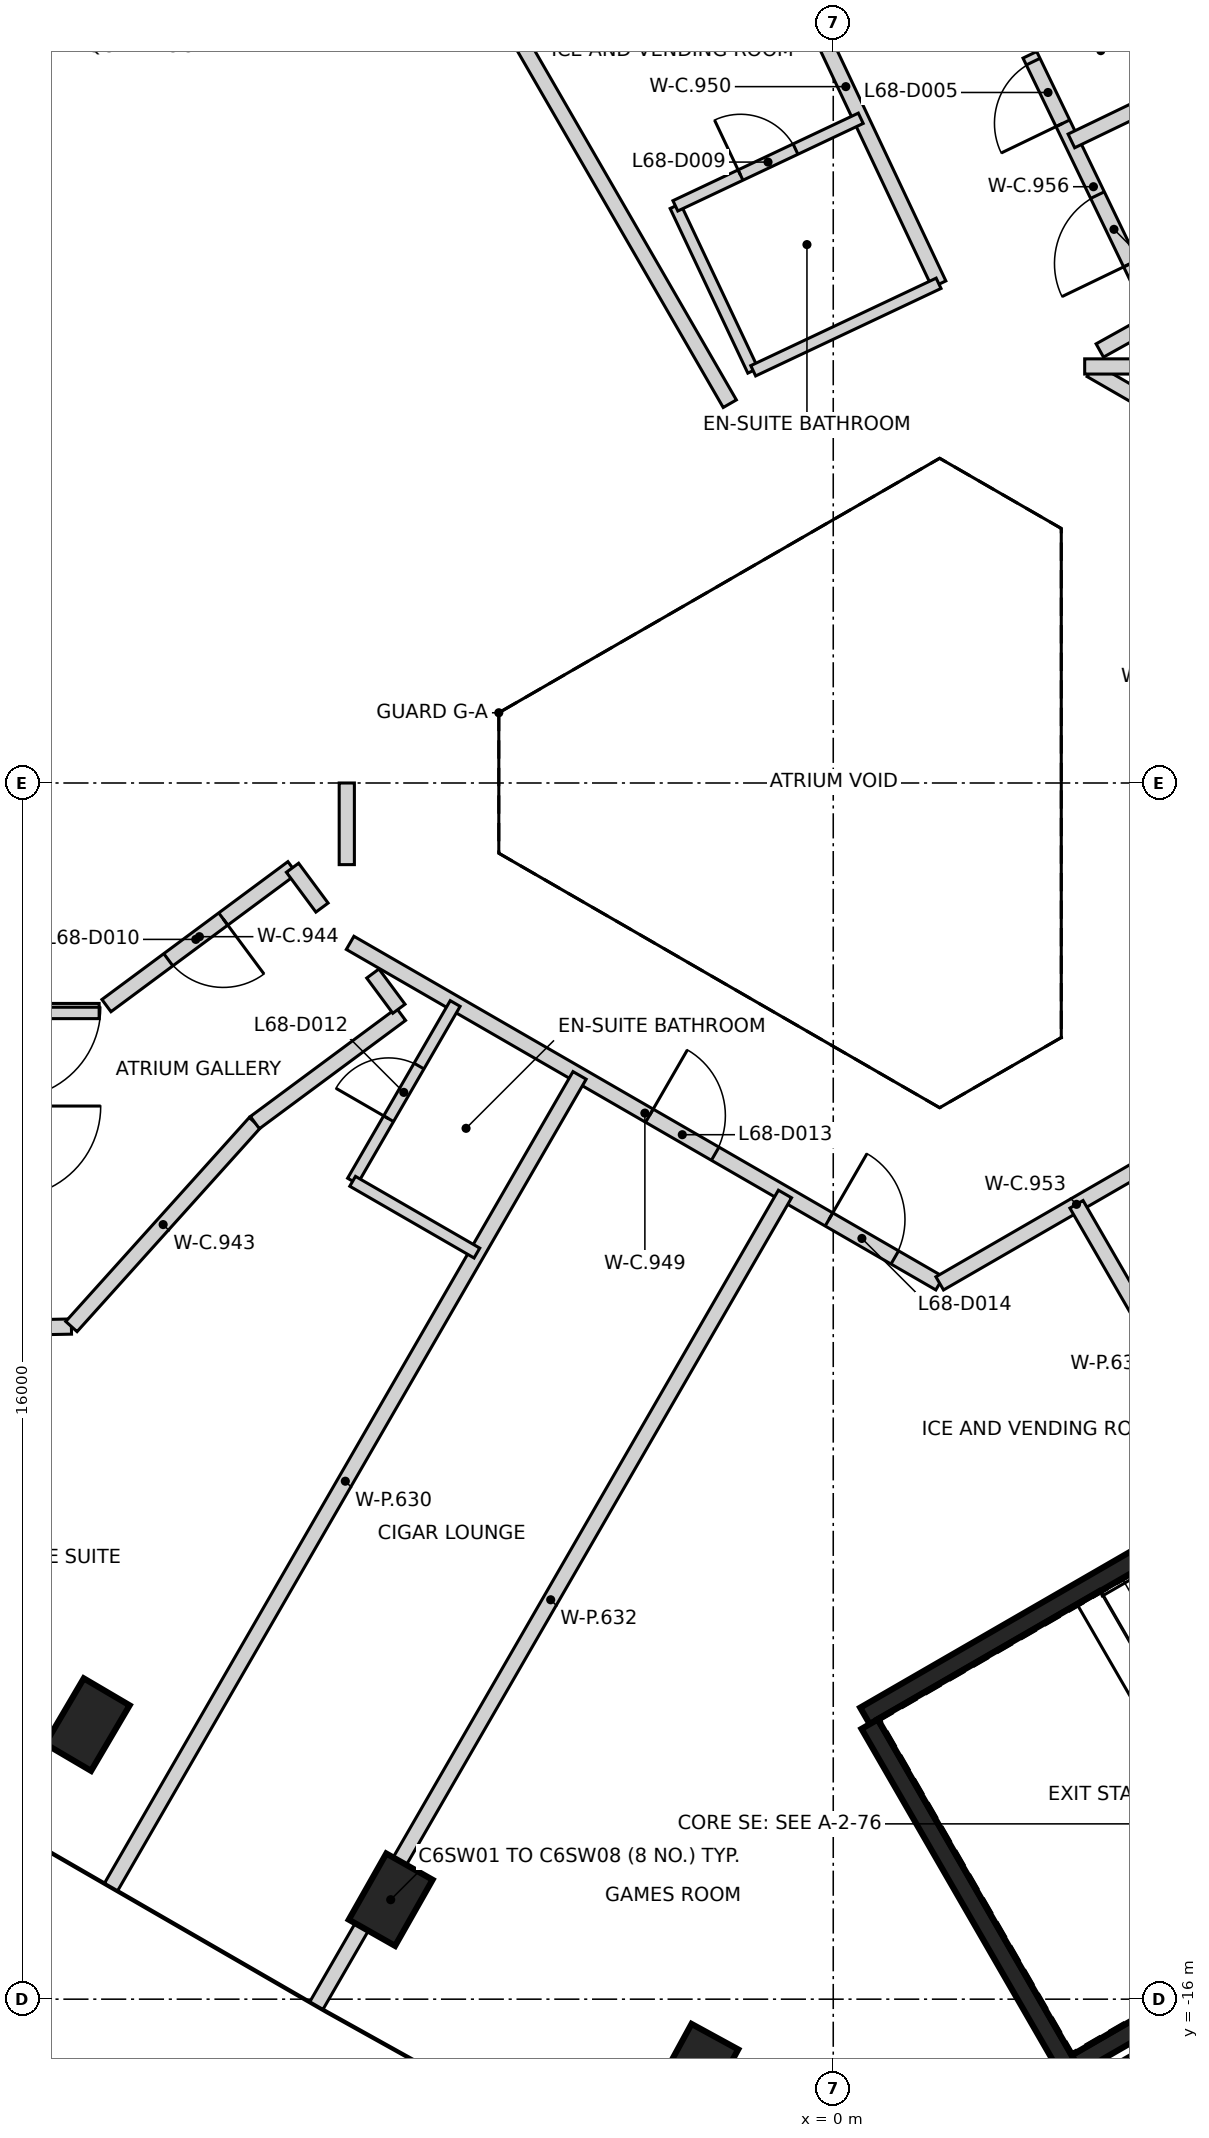
"""IFC4 building model, lengths in metres.
Left out: names, types, materials, properties, quantities, classifications, styles, units other than length and angle.
Written with IfcOpenShell. Run it as: python <this file> out.ifc"""

import sys

from ifc_helpers import new_model, si_unit, direction, frame, frame_2d, origin, origin_2d, place, context, subcontext, project, spatial, rectangle, extrude, element, fill, save


model = new_model("IFC4")
c1 = context("Model", 3, precision=1e-05, world=origin(), true_north=direction((0.0, 1.0)))
c2 = subcontext(c1, "Body", "Model", "MODEL_VIEW")
j1 = project(units=[si_unit("LENGTHUNIT", "METRE"), si_unit("PLANEANGLEUNIT", "RADIAN")], contexts=[c1])
p1 = place(None, origin())
s1 = spatial("IfcSite", under=j1, at=p1, CompositionType="ELEMENT")
p2 = place(p1, origin())
s2 = spatial("IfcBuilding", under=s1, at=p2, CompositionType="ELEMENT")
p3 = place(p2, frame((0.0, 0.0, 269.4)))
s3 = spatial("IfcBuildingStorey", under=s2, at=p3, CompositionType="ELEMENT", Elevation=269.4)
for number, where, z_axis, x_axis in (
    (1, (-9.812, -12.388, -0.35), (0.0, 0.0, 1.0), (0.507, 0.862, 0.0)),
    (2, (-5.822, -14.691, -0.35), (0.0, 0.0, 1.0), (0.493, 0.87, 0.0)),
    (3, (-1.797, -16.932, -0.35), (0.0, 0.0, 1.0), (0.479, 0.878, 0.0)),
):
    element("IfcColumn", number, at=place(p3, frame(where, z_axis=z_axis, x_axis=x_axis)), inside=s3, PredefinedType="COLUMN", context=c2, shape_type="SweptSolid", body=[
        extrude(rectangle(XDim=1.0, YDim=0.7, at=origin_2d()), origin(), (0.0, 0.0, 1.0), 3.6),
    ])
p4 = place(p3, frame((10.42, 6.498, 0.0), z_axis=(0.0, 0.0, 1.0), x_axis=(-0.866021906294, 0.500006057782, 0.0)))
e4 = element("IfcWall", 4, at=p4, inside=s3, PredefinedType="SHEAR", context=c2, shape_type="SweptSolid", body=[
    extrude(rectangle(XDim=11.55, YDim=0.25, at=frame_2d((5.775, 0.0))), origin(), (0.0, 0.0, 1.0), 3.25),
])
p5 = place(p4, frame((10.025, 0.0, 0.0)))
e5 = element("IfcOpeningElement", 5, at=p5, cuts=e4, PredefinedType="OPENING", context=c2, shape_type="SweptSolid", body=[
    extrude(rectangle(XDim=1.2, YDim=2.1, at=frame_2d((0.6, 1.05))), frame((0.0, 0.135, 0.0), z_axis=(0.0, -1.0, 0.0), x_axis=(1.0, 0.0, 0.0)), (0.0, 0.0, 1.0), 0.27),
])
p6 = place(p4, frame((8.725, 0.0, 0.0)))
e6 = element("IfcOpeningElement", 6, at=p6, cuts=e4, PredefinedType="OPENING", context=c2, shape_type="SweptSolid", body=[
    extrude(rectangle(XDim=1.2, YDim=2.1, at=frame_2d((0.6, 1.05))), frame((0.0, 0.135, 0.0), z_axis=(0.0, -1.0, 0.0), x_axis=(1.0, 0.0, 0.0)), (0.0, 0.0, 1.0), 0.27),
])
p7 = place(p3, frame((0.417, -12.273, 0.0), z_axis=(0.0, 0.0, 1.0), x_axis=(0.866021906294, 0.500006057782, 0.0)))
e7 = element("IfcWall", 7, at=p7, inside=s3, PredefinedType="SHEAR", context=c2, shape_type="SweptSolid", body=[
    extrude(rectangle(XDim=11.55, YDim=0.25, at=frame_2d((5.775, 0.0))), origin(), (0.0, 0.0, 1.0), 3.25),
])
p8 = place(p7, frame((10.025, 0.0, 0.0)))
e8 = element("IfcOpeningElement", 8, at=p8, cuts=e7, PredefinedType="OPENING", context=c2, shape_type="SweptSolid", body=[
    extrude(rectangle(XDim=1.2, YDim=2.1, at=frame_2d((0.6, 1.05))), frame((0.0, 0.135, 0.0), z_axis=(0.0, -1.0, 0.0), x_axis=(1.0, 0.0, 0.0)), (0.0, 0.0, 1.0), 0.27),
])
p9 = place(p7, frame((8.725, 0.0, 0.0)))
e9 = element("IfcOpeningElement", 9, at=p9, cuts=e7, PredefinedType="OPENING", context=c2, shape_type="SweptSolid", body=[
    extrude(rectangle(XDim=1.2, YDim=2.1, at=frame_2d((0.6, 1.05))), frame((0.0, 0.135, 0.0), z_axis=(0.0, -1.0, 0.0), x_axis=(1.0, 0.0, 0.0)), (0.0, 0.0, 1.0), 0.27),
])
p10 = place(p3, frame((3.235, -17.153, 0.0), z_axis=(0.0, 0.0, 1.0), x_axis=(-0.500008851346, 0.866020293397, 0.0)))
e10 = element("IfcWall", 10, at=p10, inside=s3, PredefinedType="SHEAR", context=c2, shape_type="SweptSolid", body=[
    extrude(rectangle(XDim=5.51, YDim=0.25, at=frame_2d((2.755, 0.0))), origin(), (0.0, 0.0, 1.0), 3.25),
])
p11 = place(p3, frame((1.669, -18.19, 0.0), z_axis=(0.0, 0.0, 1.0), x_axis=(0.866042235819, 0.499970844928, 0.0)))
e11 = element("IfcWall", 11, at=p11, inside=s3, PredefinedType="SHEAR", context=c2, shape_type="SweptSolid", body=[
    extrude(rectangle(XDim=2.865, YDim=0.25, at=frame_2d((1.432, 0.0))), origin(), (0.0, 0.0, 1.0), 3.25),
])
p12 = place(p3, frame((5.431, -15.556, 0.0), z_axis=(0.0, 0.0, 1.0), x_axis=(-0.866022940537, -0.500004266446, 0.0)))
e12 = element("IfcWall", 12, at=p12, inside=s3, PredefinedType="SHEAR", context=c2, shape_type="SweptSolid", body=[
    extrude(rectangle(XDim=2.575, YDim=0.25, at=frame_2d((1.287, 0.0))), origin(), (0.0, 0.0, 1.0), 3.25),
])
p13 = place(p3, frame((-16.732, -7.282, 0.0), z_axis=(0.0, 0.0, 1.0), x_axis=(0.999809119854, 0.019537754635, 0.0)))
e13 = element("IfcWall", 13, at=p13, inside=s3, PredefinedType="PARTITIONING", context=c2, shape_type="SweptSolid", body=[
    extrude(rectangle(XDim=6.71, YDim=0.2, at=frame_2d((3.355, 0.0))), origin(), (0.0, 0.0, 1.0), 3.25),
])
p14 = place(p13, frame((3.619, 0.0, 0.0)))
e14 = element("IfcOpeningElement", 14, at=p14, cuts=e13, PredefinedType="OPENING", context=c2, shape_type="SweptSolid", body=[
    extrude(rectangle(XDim=0.95, YDim=2.1, at=frame_2d((0.475, 1.05))), frame((0.0, 0.11, 0.0), z_axis=(0.0, -1.0, 0.0), x_axis=(1.0, 0.0, 0.0)), (0.0, 0.0, 1.0), 0.22),
])
p15 = place(p3, frame((-10.652, -3.0, 0.0), z_axis=(0.0, 0.0, 1.0), x_axis=(1.0, 0.0, 0.0)))
e15 = element("IfcWall", 15, at=p15, inside=s3, PredefinedType="PARTITIONING", context=c2, shape_type="SweptSolid", body=[
    extrude(rectangle(XDim=0.994, YDim=0.2, at=frame_2d((0.497, 0.0))), origin(), (0.0, 0.0, 1.0), 3.25),
])
p16 = place(p3, frame((-10.023, -7.151, 0.0), z_axis=(0.0, 0.0, 1.0), x_axis=(0.668886243279, 0.743364778256, 0.0)))
e16 = element("IfcWall", 16, at=p16, inside=s3, PredefinedType="PARTITIONING", context=c2, shape_type="SweptSolid", body=[
    extrude(rectangle(XDim=3.609, YDim=0.2, at=frame_2d((1.805, 0.0))), origin(), (0.0, 0.0, 1.0), 3.25),
])
p17 = place(p3, frame((-7.115, -1.115, 0.0), z_axis=(0.0, 0.0, 1.0), x_axis=(-0.803344165632, -0.595515030495, 0.0)))
e17 = element("IfcWall", 17, at=p17, inside=s3, PredefinedType="PARTITIONING", context=c2, shape_type="SweptSolid", body=[
    extrude(rectangle(XDim=3.046, YDim=0.2, at=frame_2d((1.523, 0.0))), origin(), (0.0, 0.0, 1.0), 3.25),
])
p18 = place(p17, frame((1.133, 0.0, 0.0)))
e18 = element("IfcOpeningElement", 18, at=p18, cuts=e17, PredefinedType="OPENING", context=c2, shape_type="SweptSolid", body=[
    extrude(rectangle(XDim=0.9, YDim=2.1, at=frame_2d((0.45, 1.05))), frame((0.0, 0.11, 0.0), z_axis=(0.0, -1.0, 0.0), x_axis=(1.0, 0.0, 0.0)), (0.0, 0.0, 1.0), 0.22),
])
p19 = place(p3, frame((-7.609, -4.468, 0.0), z_axis=(0.0, 0.0, 1.0), x_axis=(0.803414413351, 0.595420255298, 0.0)))
e19 = element("IfcWall", 19, at=p19, inside=s3, PredefinedType="PARTITIONING", context=c2, shape_type="SweptSolid", body=[
    extrude(rectangle(XDim=2.393, YDim=0.2, at=frame_2d((1.197, 0.0))), origin(), (0.0, 0.0, 1.0), 3.25),
])
p20 = place(p3, frame((-7.114, -1.115, 0.0), z_axis=(0.0, 0.0, 1.0), x_axis=(0.595075286625, -0.803669959155, 0.0)))
e20 = element("IfcWall", 20, at=p20, inside=s3, PredefinedType="PARTITIONING", context=c2, shape_type="SweptSolid", body=[
    extrude(rectangle(XDim=0.652, YDim=0.2, at=frame_2d((0.326, 0.0))), origin(), (0.0, 0.0, 1.0), 3.25),
])
p21 = place(p3, frame((-6.4, -1.074, 0.0), z_axis=(0.0, 0.0, 1.0), x_axis=(0.0, 1.0, 0.0)))
e21 = element("IfcWall", 21, at=p21, inside=s3, PredefinedType="PARTITIONING", context=c2, shape_type="SweptSolid", body=[
    extrude(rectangle(XDim=1.074, YDim=0.2, at=frame_2d((0.537, 0.0))), origin(), (0.0, 0.0, 1.0), 3.25),
])
p22 = place(p3, frame((-6.057, -2.507, 0.0), z_axis=(0.0, 0.0, 1.0), x_axis=(0.594974339713, -0.803744695213, 0.0)))
e22 = element("IfcWall", 22, at=p22, inside=s3, PredefinedType="PARTITIONING", context=c2, shape_type="SweptSolid", body=[
    extrude(rectangle(XDim=0.576, YDim=0.2, at=frame_2d((0.288, 0.0))), origin(), (0.0, 0.0, 1.0), 3.25),
])
p23 = place(p3, frame((-6.356, -2.103, 0.0), z_axis=(0.0, 0.0, 1.0), x_axis=(0.865939059902, -0.50014952218, 0.0)))
e23 = element("IfcWall", 23, at=p23, inside=s3, PredefinedType="PARTITIONING", context=c2, shape_type="SweptSolid", body=[
    extrude(rectangle(XDim=8.956, YDim=0.2, at=frame_2d((4.478, 0.0))), origin(), (0.0, 0.0, 1.0), 3.25),
])
p24 = place(p23, frame((4.546, 0.0, 0.0)))
e24 = element("IfcOpeningElement", 24, at=p24, cuts=e23, PredefinedType="OPENING", context=c2, shape_type="SweptSolid", body=[
    extrude(rectangle(XDim=1.0, YDim=2.1, at=frame_2d((0.5, 1.05))), frame((0.0, 0.11, 0.0), z_axis=(0.0, -1.0, 0.0), x_axis=(1.0, 0.0, 0.0)), (0.0, 0.0, 1.0), 0.22),
])
p25 = place(p23, frame((7.275, 0.0, 0.0)))
e25 = element("IfcOpeningElement", 25, at=p25, cuts=e23, PredefinedType="OPENING", context=c2, shape_type="SweptSolid", body=[
    extrude(rectangle(XDim=1.0, YDim=2.1, at=frame_2d((0.5, 1.05))), frame((0.0, 0.11, 0.0), z_axis=(0.0, -1.0, 0.0), x_axis=(1.0, 0.0, 0.0)), (0.0, 0.0, 1.0), 0.22),
])
p26 = place(p3, frame((-1.06, 11.76, 0.0), z_axis=(0.0, 0.0, 1.0), x_axis=(0.426549824954, -0.904464066081, 0.0)))
e26 = element("IfcWall", 26, at=p26, inside=s3, PredefinedType="PARTITIONING", context=c2, shape_type="SweptSolid", body=[
    extrude(rectangle(XDim=5.747, YDim=0.2, at=frame_2d((2.873, 0.0))), origin(), (0.0, 0.0, 1.0), 3.25),
])
p27 = place(p3, frame((1.401, -6.583, 0.0), z_axis=(0.0, 0.0, 1.0), x_axis=(0.865818713766, 0.500357826853, 0.0)))
e27 = element("IfcWall", 27, at=p27, inside=s3, PredefinedType="PARTITIONING", context=c2, shape_type="SweptSolid", body=[
    extrude(rectangle(XDim=4.157, YDim=0.2, at=frame_2d((2.079, 0.0))), origin(), (0.0, 0.0, 1.0), 3.25),
])
p28 = place(p3, frame((4.26, 6.109, 0.0), z_axis=(0.0, 0.0, 1.0), x_axis=(-0.434189007872, 0.900821794498, 0.0)))
e28 = element("IfcWall", 28, at=p28, inside=s3, PredefinedType="PARTITIONING", context=c2, shape_type="SweptSolid", body=[
    extrude(rectangle(XDim=3.853, YDim=0.2, at=frame_2d((1.926, 0.0))), origin(), (0.0, 0.0, 1.0), 3.25),
])
p29 = place(p28, frame((2.853, 0.0, 0.0)))
e29 = element("IfcOpeningElement", 29, at=p29, cuts=e28, PredefinedType="OPENING", context=c2, shape_type="SweptSolid", body=[
    extrude(rectangle(XDim=0.9, YDim=2.1, at=frame_2d((0.45, 1.05))), frame((0.0, 0.11, 0.0), z_axis=(0.0, -1.0, 0.0), x_axis=(1.0, 0.0, 0.0)), (0.0, 0.0, 1.0), 0.22),
])
p30 = place(p28, frame((0.804, 0.0, 0.0)))
e30 = element("IfcOpeningElement", 30, at=p30, cuts=e28, PredefinedType="OPENING", context=c2, shape_type="SweptSolid", body=[
    extrude(rectangle(XDim=1.0, YDim=2.1, at=frame_2d((0.5, 1.05))), frame((0.0, 0.11, 0.0), z_axis=(0.0, -1.0, 0.0), x_axis=(1.0, 0.0, 0.0)), (0.0, 0.0, 1.0), 0.22),
])
p31 = place(p3, frame((3.39, 5.433, 0.0), z_axis=(0.0, 0.0, 1.0), x_axis=(0.866117799835, -0.499839931186, 0.0)))
e31 = element("IfcWall", 31, at=p31, inside=s3, PredefinedType="PARTITIONING", context=c2, shape_type="SweptSolid", body=[
    extrude(rectangle(XDim=1.859, YDim=0.2, at=frame_2d((0.929, 0.0))), origin(), (0.0, 0.0, 1.0), 3.25),
])
p32 = place(p3, frame((3.507, 5.69, 0.0), z_axis=(0.0, 0.0, 1.0), x_axis=(0.873567976284, 0.486702158215, 0.0)))
e32 = element("IfcWall", 32, at=p32, inside=s3, PredefinedType="PARTITIONING", context=c2, shape_type="SweptSolid", body=[
    extrude(rectangle(XDim=0.861, YDim=0.2, at=frame_2d((0.43, 0.0))), origin(), (0.0, 0.0, 1.0), 3.25),
])
p33 = place(p3, frame((-9.501, -14.524, 0.0), z_axis=(0.0, 0.0, 1.0), x_axis=(0.499964147476, 0.86604610226, 0.0)))
e33 = element("IfcWall", 33, at=p33, inside=s3, PredefinedType="PARTITIONING", context=c2, shape_type="SweptSolid", body=[
    extrude(rectangle(XDim=12.329, YDim=0.2, at=frame_2d((6.165, 0.0))), origin(), (0.0, 0.0, 1.0), 2.35),
])
p34 = place(p3, frame((-7.524, 15.666, 0.0), z_axis=(0.0, 0.0, 1.0), x_axis=(0.499979611936, -0.866037174519, 0.0)))
e34 = element("IfcWall", 34, at=p34, inside=s3, PredefinedType="PARTITIONING", context=c2, shape_type="SweptSolid", body=[
    extrude(rectangle(XDim=12.327, YDim=0.2, at=frame_2d((6.164, 0.0))), origin(), (0.0, 0.0, 1.0), 2.35),
])
p35 = place(p3, frame((-6.8, -16.084, 0.0), z_axis=(0.0, 0.0, 1.0), x_axis=(0.500002425662, 0.866024003323, 0.0)))
e35 = element("IfcWall", 35, at=p35, inside=s3, PredefinedType="PARTITIONING", context=c2, shape_type="SweptSolid", body=[
    extrude(rectangle(XDim=12.329, YDim=0.2, at=frame_2d((6.165, 0.0))), origin(), (0.0, 0.0, 1.0), 3.25),
])
p36 = place(p3, frame((3.133, 8.447, 0.0), z_axis=(0.0, 0.0, 1.0), x_axis=(0.900981876458, 0.433856725538, 0.0)))
e36 = element("IfcWall", 36, at=p36, inside=s3, PredefinedType="PARTITIONING", context=c2, shape_type="SweptSolid", body=[
    extrude(rectangle(XDim=2.143, YDim=0.2, at=frame_2d((1.071, 0.0))), origin(), (0.0, 0.0, 1.0), 3.25),
])
p37 = place(p3, frame((3.2, -5.543, 0.0), z_axis=(0.0, 0.0, 1.0), x_axis=(0.500060428066, -0.865990512813, 0.0)))
e37 = element("IfcWall", 37, at=p37, inside=s3, PredefinedType="PARTITIONING", context=c2, shape_type="SweptSolid", body=[
    extrude(rectangle(XDim=4.252, YDim=0.2, at=frame_2d((2.126, 0.0))), origin(), (0.0, 0.0, 1.0), 3.25),
])
p38 = place(p3, frame((3.308, 5.48, 0.0), z_axis=(0.0, 0.0, 1.0), x_axis=(1.0, 0.0, 0.0)))
e38 = element("IfcWall", 38, at=p38, inside=s3, PredefinedType="PARTITIONING", context=c2, shape_type="SweptSolid", body=[
    extrude(rectangle(XDim=13.971, YDim=0.2, at=frame_2d((6.986, 0.0))), origin(), (0.0, 0.0, 1.0), 2.35),
])
p39 = place(p3, frame((-6.324, -5.237, 0.0), z_axis=(0.0, 0.0, 1.0), x_axis=(0.500294180644, 0.865855491877, 0.0)))
e39 = element("IfcWall", 39, at=p39, inside=s3, PredefinedType="PARTITIONING", context=c2, shape_type="SweptSolid", body=[
    extrude(rectangle(XDim=2.698, YDim=0.15, at=frame_2d((1.349, 0.0))), origin(), (0.0, 0.0, 1.0), 3.25),
])
p40 = place(p39, frame((0.948, 0.0, 0.0)))
e40 = element("IfcOpeningElement", 40, at=p40, cuts=e39, PredefinedType="OPENING", context=c2, shape_type="SweptSolid", body=[
    extrude(rectangle(XDim=0.8, YDim=2.1, at=frame_2d((0.4, 1.05))), frame((0.0, 0.085, 0.0), z_axis=(0.0, -1.0, 0.0), x_axis=(1.0, 0.0, 0.0)), (0.0, 0.0, 1.0), 0.17),
])
p41 = place(p3, frame((-6.323, -5.24, 0.0), z_axis=(0.0, 0.0, 1.0), x_axis=(0.865998231832, -0.50004706025, 0.0)))
e41 = element("IfcWall", 41, at=p41, inside=s3, PredefinedType="PARTITIONING", context=c2, shape_type="SweptSolid", body=[
    extrude(rectangle(XDim=1.888, YDim=0.15, at=frame_2d((0.944, 0.0))), origin(), (0.0, 0.0, 1.0), 3.25),
])
p42 = place(p3, frame((-2.078, 7.59, 0.0), z_axis=(0.0, 0.0, 1.0), x_axis=(0.426709924428, -0.904388545037, 0.0)))
e42 = element("IfcWall", 42, at=p42, inside=s3, PredefinedType="PARTITIONING", context=c2, shape_type="SweptSolid", body=[
    extrude(rectangle(XDim=2.395, YDim=0.15, at=frame_2d((1.198, 0.0))), origin(), (0.0, 0.0, 1.0), 3.25),
])
p43 = place(p3, frame((-2.077, 7.593, 0.0), z_axis=(0.0, 0.0, 1.0), x_axis=(0.904196218291, 0.427117312724, 0.0)))
e43 = element("IfcWall", 43, at=p43, inside=s3, PredefinedType="PARTITIONING", context=c2, shape_type="SweptSolid", body=[
    extrude(rectangle(XDim=2.697, YDim=0.15, at=frame_2d((1.349, 0.0))), origin(), (0.0, 0.0, 1.0), 3.25),
])
p44 = place(p43, frame((0.948, 0.0, 0.0)))
e44 = element("IfcOpeningElement", 44, at=p44, cuts=e43, PredefinedType="OPENING", context=c2, shape_type="SweptSolid", body=[
    extrude(rectangle(XDim=0.8, YDim=2.1, at=frame_2d((0.4, 1.05))), frame((0.0, 0.085, 0.0), z_axis=(0.0, -1.0, 0.0), x_axis=(1.0, 0.0, 0.0)), (0.0, 0.0, 1.0), 0.17),
])
p45 = place(p3, frame((-1.053, 5.423, 0.0), z_axis=(0.0, 0.0, 1.0), x_axis=(0.904370950432, 0.426747213247, 0.0)))
e45 = element("IfcWall", 45, at=p45, inside=s3, PredefinedType="PARTITIONING", context=c2, shape_type="SweptSolid", body=[
    extrude(rectangle(XDim=2.697, YDim=0.15, at=frame_2d((1.348, 0.0))), origin(), (0.0, 0.0, 1.0), 3.25),
])
p46 = place(p29, origin())
e46 = element("IfcDoor", 46, at=p46, inside=s3, OperationType="SINGLE_SWING_LEFT", PredefinedType="DOOR", context=c2, shape_type="SweptSolid", body=[
    extrude(rectangle(XDim=0.9, YDim=2.1, at=frame_2d((0.45, 1.05))), frame((0.0, 0.025, 0.0), z_axis=(0.0, -1.0, 0.0), x_axis=(1.0, 0.0, 0.0)), (0.0, 0.0, 1.0), 0.05),
])
fill(e29, e46)
p47 = place(p30, origin())
e47 = element("IfcDoor", 47, at=p47, inside=s3, OperationType="SINGLE_SWING_LEFT", PredefinedType="DOOR", context=c2, shape_type="SweptSolid", body=[
    extrude(rectangle(XDim=1.0, YDim=2.1, at=frame_2d((0.5, 1.05))), frame((0.0, 0.025, 0.0), z_axis=(0.0, -1.0, 0.0), x_axis=(1.0, 0.0, 0.0)), (0.0, 0.0, 1.0), 0.05),
])
fill(e30, e47)
p48 = place(p44, origin())
e48 = element("IfcDoor", 48, at=p48, inside=s3, OperationType="SINGLE_SWING_LEFT", PredefinedType="DOOR", context=c2, shape_type="SweptSolid", body=[
    extrude(rectangle(XDim=0.8, YDim=2.1, at=frame_2d((0.4, 1.05))), frame((0.0, 0.025, 0.0), z_axis=(0.0, -1.0, 0.0), x_axis=(1.0, 0.0, 0.0)), (0.0, 0.0, 1.0), 0.05),
])
fill(e44, e48)
p49 = place(p18, origin())
e49 = element("IfcDoor", 49, at=p49, inside=s3, OperationType="SINGLE_SWING_LEFT", PredefinedType="DOOR", context=c2, shape_type="SweptSolid", body=[
    extrude(rectangle(XDim=0.9, YDim=2.1, at=frame_2d((0.45, 1.05))), frame((0.0, 0.025, 0.0), z_axis=(0.0, -1.0, 0.0), x_axis=(1.0, 0.0, 0.0)), (0.0, 0.0, 1.0), 0.05),
])
fill(e18, e49)
p50 = place(p40, origin())
e50 = element("IfcDoor", 50, at=p50, inside=s3, OperationType="SINGLE_SWING_LEFT", PredefinedType="DOOR", context=c2, shape_type="SweptSolid", body=[
    extrude(rectangle(XDim=0.8, YDim=2.1, at=frame_2d((0.4, 1.05))), frame((0.0, 0.025, 0.0), z_axis=(0.0, -1.0, 0.0), x_axis=(1.0, 0.0, 0.0)), (0.0, 0.0, 1.0), 0.05),
])
fill(e40, e50)
p51 = place(p24, frame((1.0, 0.0, 0.0), z_axis=(0.0, 0.0, 1.0), x_axis=(-1.0, 0.0, 0.0)))
e51 = element("IfcDoor", 51, at=p51, inside=s3, OperationType="SINGLE_SWING_LEFT", PredefinedType="DOOR", context=c2, shape_type="SweptSolid", body=[
    extrude(rectangle(XDim=1.0, YDim=2.1, at=frame_2d((0.5, 1.05))), frame((0.0, 0.025, 0.0), z_axis=(0.0, -1.0, 0.0), x_axis=(1.0, 0.0, 0.0)), (0.0, 0.0, 1.0), 0.05),
])
fill(e24, e51)
p52 = place(p25, frame((1.0, 0.0, 0.0), z_axis=(0.0, 0.0, 1.0), x_axis=(-1.0, 0.0, 0.0)))
e52 = element("IfcDoor", 52, at=p52, inside=s3, OperationType="SINGLE_SWING_LEFT", PredefinedType="DOOR", context=c2, shape_type="SweptSolid", body=[
    extrude(rectangle(XDim=1.0, YDim=2.1, at=frame_2d((0.5, 1.05))), frame((0.0, 0.025, 0.0), z_axis=(0.0, -1.0, 0.0), x_axis=(1.0, 0.0, 0.0)), (0.0, 0.0, 1.0), 0.05),
])
fill(e25, e52)
save(model, sys.argv[1])
